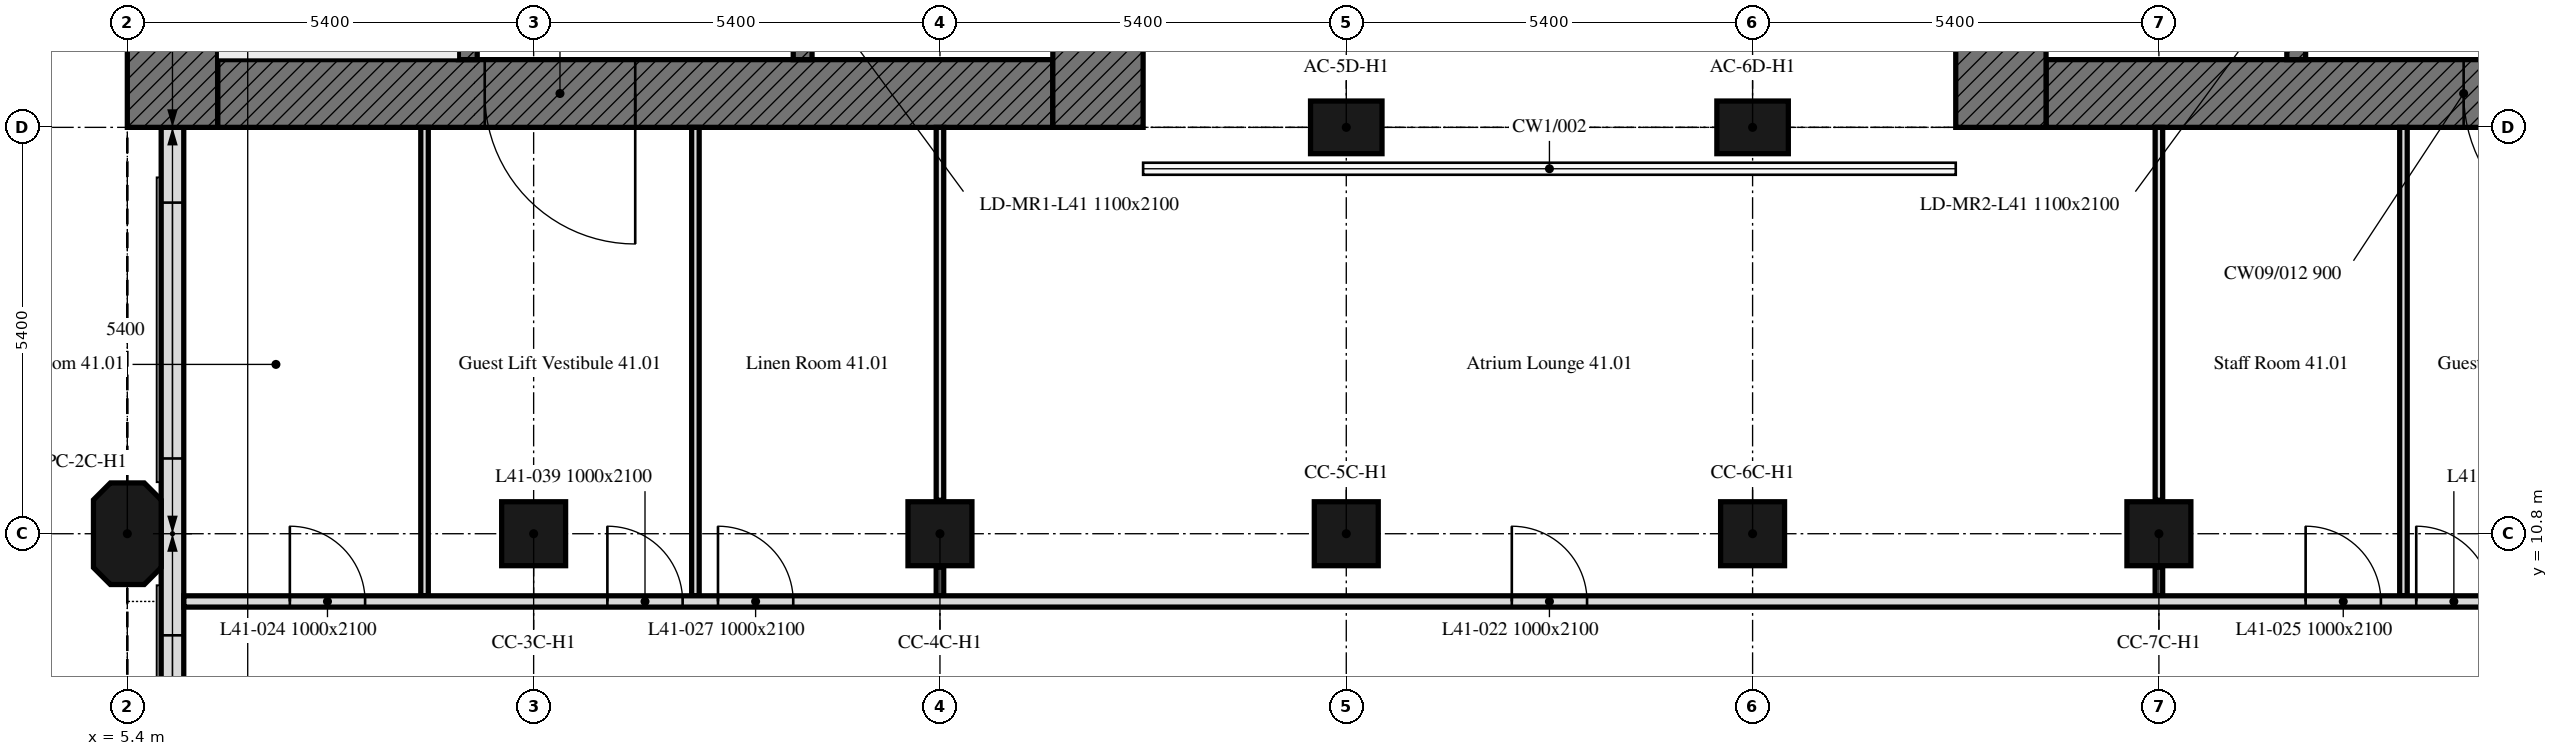
"""IFC4 building model, lengths in metres.
Left out: names, types, materials, properties, quantities, classifications, styles, units other than length and angle.
Written with IfcOpenShell. Run it as: python <this file> out.ifc"""

import sys

from ifc_helpers import new_model, si_unit, direction, frame, frame_2d, origin, origin_2d, place, context, subcontext, project, spatial, polyline, rectangle, outline, extrude, element, fill, save


model = new_model("IFC4")
c1 = context("Model", 3, precision=1e-05, world=origin(), true_north=direction((0.0, 1.0)))
c2 = subcontext(c1, "Body", "Model", "MODEL_VIEW")
j1 = project(units=[si_unit("LENGTHUNIT", "METRE"), si_unit("PLANEANGLEUNIT", "RADIAN")], contexts=[c1])
p1 = place(None, origin())
s1 = spatial("IfcSite", under=j1, at=p1, CompositionType="ELEMENT")
p2 = place(p1, origin())
s2 = spatial("IfcBuilding", under=s1, at=p2, CompositionType="ELEMENT")
p3 = place(p2, frame((0.0, 0.0, 172.6)))
s3 = spatial("IfcBuildingStorey", under=s2, at=p3, CompositionType="ELEMENT", Elevation=172.6)
p4 = place(p3, frame((5.4, 10.8, 0.0), z_axis=(0.0, 0.0, 1.0), x_axis=(0.0, 1.0, 0.0)))
e1 = element("IfcColumn", 1, at=p4, inside=s3, PredefinedType="COLUMN", context=c2, shape_type="SweptSolid", body=[
    extrude(outline(polyline([(-0.45, -0.45), (0.45, -0.45), (0.675, -0.225), (0.675, 0.225), (0.45, 0.45), (-0.45, 0.45), (-0.675, 0.225), (-0.675, -0.225), (-0.45, -0.45)])), origin(), (0.0, 0.0, 1.0), 2.8),
])
for number, where, z_axis, x_axis in (
    (2, (10.8, 10.8, 0.0), (0.0, 0.0, 1.0), (1.0, 0.0, 0.0)),
    (3, (16.2, 10.8, 0.0), (0.0, 0.0, 1.0), (1.0, 0.0, 0.0)),
    (4, (21.6, 10.8, 0.0), (0.0, 0.0, 1.0), (1.0, 0.0, 0.0)),
    (5, (27.0, 10.8, 0.0), (0.0, 0.0, 1.0), (1.0, 0.0, 0.0)),
    (6, (32.4, 10.8, 0.0), (0.0, 0.0, 1.0), (1.0, 0.0, 0.0)),
):
    element("IfcColumn", number, at=place(p3, frame(where, z_axis=z_axis, x_axis=x_axis)), inside=s3, PredefinedType="COLUMN", context=c2, shape_type="SweptSolid", body=[
        extrude(rectangle(XDim=0.85, YDim=0.85, at=origin_2d()), origin(), (0.0, 0.0, 1.0), 2.8),
    ])
for number, where, z_axis, x_axis in (
    (7, (21.6, 16.2, 0.0), (0.0, 0.0, 1.0), (1.0, 0.0, 0.0)),
    (8, (27.0, 16.2, 0.0), (0.0, 0.0, 1.0), (1.0, 0.0, 0.0)),
):
    element("IfcColumn", number, at=place(p3, frame(where, z_axis=z_axis, x_axis=x_axis)), inside=s3, PredefinedType="COLUMN", context=c2, shape_type="SweptSolid", body=[
        extrude(rectangle(XDim=0.95, YDim=0.7, at=origin_2d()), origin(), (0.0, 0.0, 1.0), 2.8),
    ])
p5 = place(p3, frame((6.0, 16.2, 0.0), z_axis=(0.0, 0.0, 1.0), x_axis=(0.0, -1.0, 0.0)))
e9 = element("IfcWall", 9, at=p5, inside=s3, PredefinedType="SOLIDWALL", context=c2, shape_type="SweptSolid", body=[
    extrude(rectangle(XDim=10.614, YDim=0.3, at=frame_2d((5.307, 0.0))), origin(), (0.0, 0.0, 1.0), 2.8),
])
p6 = place(p5, frame((1.0, 0.0, 0.9)))
e10 = element("IfcOpeningElement", 10, at=p6, cuts=e9, PredefinedType="OPENING", context=c2, shape_type="SweptSolid", body=[
    extrude(rectangle(XDim=3.4, YDim=1.7, at=frame_2d((1.7, 0.85))), frame((0.0, 0.16, 0.0), z_axis=(0.0, -1.0, 0.0), x_axis=(1.0, 0.0, 0.0)), (0.0, 0.0, 1.0), 0.32),
])
p7 = place(p5, frame((6.75, 0.0, 0.9)))
e11 = element("IfcOpeningElement", 11, at=p7, cuts=e9, PredefinedType="OPENING", context=c2, shape_type="SweptSolid", body=[
    extrude(rectangle(XDim=1.1, YDim=1.7, at=frame_2d((0.55, 0.85))), frame((0.0, 0.16, 0.0), z_axis=(0.0, -1.0, 0.0), x_axis=(1.0, 0.0, 0.0)), (0.0, 0.0, 1.0), 0.32),
])
p8 = place(p5, frame((8.35, 0.0, 0.9)))
e12 = element("IfcOpeningElement", 12, at=p8, cuts=e9, PredefinedType="OPENING", context=c2, shape_type="SweptSolid", body=[
    extrude(rectangle(XDim=1.1, YDim=1.7, at=frame_2d((0.55, 0.85))), frame((0.0, 0.16, 0.0), z_axis=(0.0, -1.0, 0.0), x_axis=(1.0, 0.0, 0.0)), (0.0, 0.0, 1.0), 0.32),
])
p9 = place(p3, frame((17.7, 16.65, 0.0), z_axis=(0.0, 0.0, 1.0), x_axis=(-1.0, 0.0, 0.0)))
e13 = element("IfcWall", 13, at=p9, inside=s3, PredefinedType="SOLIDWALL", context=c2, shape_type="SweptSolid", body=[
    extrude(rectangle(XDim=11.1, YDim=0.9, at=frame_2d((5.55, 0.0))), origin(), (0.0, 0.0, 1.0), 2.8),
])
p10 = place(p9, frame((5.55, 0.0, 0.0)))
e14 = element("IfcOpeningElement", 14, at=p10, cuts=e13, PredefinedType="OPENING", context=c2, shape_type="SweptSolid", body=[
    extrude(rectangle(XDim=2.0, YDim=2.4, at=frame_2d((1.0, 1.2))), frame((0.0, 0.45, 0.0), z_axis=(0.0, -1.0, 0.0), x_axis=(1.0, 0.0, 0.0)), (0.0, 0.0, 1.0), 0.9),
])
for number, where, z_axis, x_axis in (
    (15, (6.0, 16.2, 0.0), (0.0, 0.0, 1.0), (0.0, 1.0, 0.0)),
    (16, (18.3, 32.4, 0.0), (0.0, 0.0, 1.0), (0.0, -1.0, 0.0)),
):
    element("IfcWall", number, at=place(p3, frame(where, z_axis=z_axis, x_axis=x_axis)), inside=s3, PredefinedType="SOLIDWALL", context=c2, shape_type="SweptSolid", body=[
        extrude(rectangle(XDim=16.2, YDim=1.2, at=frame_2d((8.1, 0.0))), origin(), (0.0, 0.0, 1.0), 2.8),
    ])
p11 = place(p3, frame((9.925, 17.1, 0.0), z_axis=(0.0, 0.0, 1.0), x_axis=(0.0, 1.0, 0.0)))
e17 = element("IfcWall", 17, at=p11, inside=s3, PredefinedType="SOLIDWALL", context=c2, shape_type="SweptSolid", body=[
    extrude(rectangle(XDim=14.4, YDim=0.25, at=frame_2d((7.2, 0.0))), origin(), (0.0, 0.0, 1.0), 2.8),
])
p12 = place(p11, frame((4.6, 0.0, 0.0)))
e18 = element("IfcOpeningElement", 18, at=p12, cuts=e17, PredefinedType="OPENING", context=c2, shape_type="SweptSolid", body=[
    extrude(rectangle(XDim=1.0, YDim=2.1, at=frame_2d((0.5, 1.05))), frame((0.0, 0.125, 0.0), z_axis=(0.0, -1.0, 0.0), x_axis=(1.0, 0.0, 0.0)), (0.0, 0.0, 1.0), 0.25),
])
p13 = place(p11, frame((7.062, 0.0, 0.0)))
e19 = element("IfcOpeningElement", 19, at=p13, cuts=e17, PredefinedType="OPENING", context=c2, shape_type="SweptSolid", body=[
    extrude(rectangle(XDim=1.2, YDim=2.1, at=frame_2d((0.6, 1.05))), frame((0.0, 0.125, 0.0), z_axis=(0.0, -1.0, 0.0), x_axis=(1.0, 0.0, 0.0)), (0.0, 0.0, 1.0), 0.25),
])
p14 = place(p11, frame((9.599, 0.0, 0.0)))
e20 = element("IfcOpeningElement", 20, at=p14, cuts=e17, PredefinedType="OPENING", context=c2, shape_type="SweptSolid", body=[
    extrude(rectangle(XDim=0.9, YDim=2.1, at=frame_2d((0.45, 1.05))), frame((0.0, 0.125, 0.0), z_axis=(0.0, -1.0, 0.0), x_axis=(1.0, 0.0, 0.0)), (0.0, 0.0, 1.0), 0.25),
])
p15 = place(p11, frame((11.032, 0.0, 0.0)))
e21 = element("IfcOpeningElement", 21, at=p15, cuts=e17, PredefinedType="OPENING", context=c2, shape_type="SweptSolid", body=[
    extrude(rectangle(XDim=0.9, YDim=2.1, at=frame_2d((0.45, 1.05))), frame((0.0, 0.125, 0.0), z_axis=(0.0, -1.0, 0.0), x_axis=(1.0, 0.0, 0.0)), (0.0, 0.0, 1.0), 0.25),
])
p16 = place(p11, frame((12.846, 0.0, 0.0)))
e22 = element("IfcOpeningElement", 22, at=p16, cuts=e17, PredefinedType="OPENING", context=c2, shape_type="SweptSolid", body=[
    extrude(rectangle(XDim=0.9, YDim=2.1, at=frame_2d((0.45, 1.05))), frame((0.0, 0.125, 0.0), z_axis=(0.0, -1.0, 0.0), x_axis=(1.0, 0.0, 0.0)), (0.0, 0.0, 1.0), 0.25),
])
p17 = place(p3, frame((14.375, 17.1, 0.0), z_axis=(0.0, 0.0, 1.0), x_axis=(0.0, 1.0, 0.0)))
e23 = element("IfcWall", 23, at=p17, inside=s3, PredefinedType="SOLIDWALL", context=c2, shape_type="SweptSolid", body=[
    extrude(rectangle(XDim=14.4, YDim=0.25, at=frame_2d((7.2, 0.0))), origin(), (0.0, 0.0, 1.0), 2.8),
])
p18 = place(p17, frame((13.15, 0.0, 0.0)))
e24 = element("IfcOpeningElement", 24, at=p18, cuts=e23, PredefinedType="OPENING", context=c2, shape_type="SweptSolid", body=[
    extrude(rectangle(XDim=1.0, YDim=2.1, at=frame_2d((0.5, 1.05))), frame((0.0, 0.125, 0.0), z_axis=(0.0, -1.0, 0.0), x_axis=(1.0, 0.0, 0.0)), (0.0, 0.0, 1.0), 0.25),
])
p19 = place(p17, frame((0.6, 0.0, 0.0)))
e25 = element("IfcOpeningElement", 25, at=p19, cuts=e23, PredefinedType="OPENING", context=c2, shape_type="SweptSolid", body=[
    extrude(rectangle(XDim=1.1, YDim=2.1, at=frame_2d((0.55, 1.05))), frame((0.0, 0.125, 0.0), z_axis=(0.0, -1.0, 0.0), x_axis=(1.0, 0.0, 0.0)), (0.0, 0.0, 1.0), 0.25),
])
p20 = place(p17, frame((3.25, 0.0, 0.0)))
e26 = element("IfcOpeningElement", 26, at=p20, cuts=e23, PredefinedType="OPENING", context=c2, shape_type="SweptSolid", body=[
    extrude(rectangle(XDim=0.9, YDim=2.1, at=frame_2d((0.45, 1.05))), frame((0.0, 0.125, 0.0), z_axis=(0.0, -1.0, 0.0), x_axis=(1.0, 0.0, 0.0)), (0.0, 0.0, 1.0), 0.25),
])
p21 = place(p3, frame((42.0, 16.65, 0.0), z_axis=(0.0, 0.0, 1.0), x_axis=(-1.0, 0.0, 0.0)))
e27 = element("IfcWall", 27, at=p21, inside=s3, PredefinedType="SOLIDWALL", context=c2, shape_type="SweptSolid", body=[
    extrude(rectangle(XDim=11.1, YDim=0.9, at=frame_2d((5.55, 0.0))), origin(), (0.0, 0.0, 1.0), 2.8),
])
p22 = place(p21, frame((3.55, 0.0, 0.0)))
e28 = element("IfcOpeningElement", 28, at=p22, cuts=e27, PredefinedType="OPENING", context=c2, shape_type="SweptSolid", body=[
    extrude(rectangle(XDim=2.0, YDim=2.4, at=frame_2d((1.0, 1.2))), frame((0.0, 0.45, 0.0), z_axis=(0.0, -1.0, 0.0), x_axis=(1.0, 0.0, 0.0)), (0.0, 0.0, 1.0), 0.9),
])
p23 = place(p3, frame((30.3, 16.2, 0.0), z_axis=(0.0, 0.0, 1.0), x_axis=(0.0, 1.0, 0.0)))
e29 = element("IfcWall", 29, at=p23, inside=s3, PredefinedType="SOLIDWALL", context=c2, shape_type="SweptSolid", body=[
    extrude(rectangle(XDim=16.2, YDim=1.2, at=frame_2d((8.1, 0.0))), origin(), (0.0, 0.0, 1.0), 2.8),
])
p24 = place(p3, frame((34.225, 17.1, 0.0), z_axis=(0.0, 0.0, 1.0), x_axis=(0.0, 1.0, 0.0)))
e30 = element("IfcWall", 30, at=p24, inside=s3, PredefinedType="SOLIDWALL", context=c2, shape_type="SweptSolid", body=[
    extrude(rectangle(XDim=14.4, YDim=0.25, at=frame_2d((7.2, 0.0))), origin(), (0.0, 0.0, 1.0), 2.8),
])
p25 = place(p24, frame((13.15, 0.0, 0.0)))
e31 = element("IfcOpeningElement", 31, at=p25, cuts=e30, PredefinedType="OPENING", context=c2, shape_type="SweptSolid", body=[
    extrude(rectangle(XDim=1.0, YDim=2.1, at=frame_2d((0.5, 1.05))), frame((0.0, 0.125, 0.0), z_axis=(0.0, -1.0, 0.0), x_axis=(1.0, 0.0, 0.0)), (0.0, 0.0, 1.0), 0.25),
])
p26 = place(p24, frame((0.6, 0.0, 0.0)))
e32 = element("IfcOpeningElement", 32, at=p26, cuts=e30, PredefinedType="OPENING", context=c2, shape_type="SweptSolid", body=[
    extrude(rectangle(XDim=1.1, YDim=2.1, at=frame_2d((0.55, 1.05))), frame((0.0, 0.125, 0.0), z_axis=(0.0, -1.0, 0.0), x_axis=(1.0, 0.0, 0.0)), (0.0, 0.0, 1.0), 0.25),
])
p27 = place(p24, frame((3.25, 0.0, 0.0)))
e33 = element("IfcOpeningElement", 33, at=p27, cuts=e30, PredefinedType="OPENING", context=c2, shape_type="SweptSolid", body=[
    extrude(rectangle(XDim=0.9, YDim=2.1, at=frame_2d((0.45, 1.05))), frame((0.0, 0.125, 0.0), z_axis=(0.0, -1.0, 0.0), x_axis=(1.0, 0.0, 0.0)), (0.0, 0.0, 1.0), 0.25),
])
p28 = place(p3, frame((16.2, 16.2, 0.0), z_axis=(0.0, 0.0, 1.0), x_axis=(0.0, -1.0, 0.0)))
e34 = element("IfcWall", 34, at=p28, inside=s3, PredefinedType="PARTITIONING", context=c2, shape_type="SweptSolid", body=[
    extrude(rectangle(XDim=4.955, YDim=0.1, at=frame_2d((2.478, 0.0))), origin(), (0.0, 0.0, 1.0), 2.2),
])
for number, where, z_axis, x_axis in (
    (35, (16.2, 10.355, 0.0), (0.0, 0.0, 1.0), (0.0, -1.0, 0.0)),
    (36, (32.4, 9.975, 0.0), (0.0, 0.0, 1.0), (0.0, 1.0, 0.0)),
):
    element("IfcWall", number, at=place(p3, frame(where, z_axis=z_axis, x_axis=x_axis)), inside=s3, PredefinedType="PARTITIONING", context=c2, shape_type="SweptSolid", body=[
        extrude(rectangle(XDim=0.38, YDim=0.1, at=frame_2d((0.19, 0.0))), origin(), (0.0, 0.0, 1.0), 2.2),
    ])
p29 = place(p3, frame((32.4, 11.245, 0.0), z_axis=(0.0, 0.0, 1.0), x_axis=(0.0, 1.0, 0.0)))
e37 = element("IfcWall", 37, at=p29, inside=s3, PredefinedType="PARTITIONING", context=c2, shape_type="SweptSolid", body=[
    extrude(rectangle(XDim=4.955, YDim=0.1, at=frame_2d((2.478, 0.0))), origin(), (0.0, 0.0, 1.0), 2.2),
])
for number, where, z_axis, x_axis in (
    (38, (9.35, 16.2, 0.0), (0.0, 0.0, 1.0), (0.0, -1.0, 0.0)),
    (39, (12.95, 9.975, 0.0), (0.0, 0.0, 1.0), (0.0, 1.0, 0.0)),
):
    element("IfcWall", number, at=place(p3, frame(where, z_axis=z_axis, x_axis=x_axis)), inside=s3, PredefinedType="PARTITIONING", context=c2, shape_type="SweptSolid", body=[
        extrude(rectangle(XDim=6.225, YDim=0.1, at=frame_2d((3.112, 0.0))), origin(), (0.0, 0.0, 1.0), 2.8),
    ])
p30 = place(p3, frame((35.65, 16.2, 0.0), z_axis=(0.0, 0.0, 1.0), x_axis=(0.0, -1.0, 0.0)))
e40 = element("IfcWall", 40, at=p30, inside=s3, PredefinedType="PARTITIONING", context=c2, shape_type="SweptSolid", body=[
    extrude(rectangle(XDim=6.225, YDim=0.1, at=frame_2d((3.112, 0.0))), origin(), (0.0, 0.0, 1.0), 2.2),
])
p31 = place(p3, frame((6.151, 9.9, 0.0), z_axis=(0.0, 0.0, 1.0), x_axis=(1.0, 0.0, 0.0)))
e41 = element("IfcWall", 41, at=p31, inside=s3, PredefinedType="PARTITIONING", context=c2, shape_type="SweptSolid", body=[
    extrude(rectangle(XDim=36.974, YDim=0.15, at=frame_2d((18.487, 0.0))), origin(), (0.0, 0.0, 1.0), 2.2),
])
p32 = place(p31, frame((17.649, 0.0, 0.0)))
e42 = element("IfcOpeningElement", 42, at=p32, cuts=e41, PredefinedType="OPENING", context=c2, shape_type="SweptSolid", body=[
    extrude(rectangle(XDim=1.0, YDim=2.1, at=frame_2d((0.5, 1.05))), frame((0.0, 0.075, 0.0), z_axis=(0.0, -1.0, 0.0), x_axis=(1.0, 0.0, 0.0)), (0.0, 0.0, 1.0), 0.15),
])
p33 = place(p31, frame((1.409, 0.0, 0.0)))
e43 = element("IfcOpeningElement", 43, at=p33, cuts=e41, PredefinedType="OPENING", context=c2, shape_type="SweptSolid", body=[
    extrude(rectangle(XDim=1.0, YDim=2.1, at=frame_2d((0.5, 1.05))), frame((0.0, 0.075, 0.0), z_axis=(0.0, -1.0, 0.0), x_axis=(1.0, 0.0, 0.0)), (0.0, 0.0, 1.0), 0.15),
])
p34 = place(p31, frame((28.199, 0.0, 0.0)))
e44 = element("IfcOpeningElement", 44, at=p34, cuts=e41, PredefinedType="OPENING", context=c2, shape_type="SweptSolid", body=[
    extrude(rectangle(XDim=1.0, YDim=2.1, at=frame_2d((0.5, 1.05))), frame((0.0, 0.075, 0.0), z_axis=(0.0, -1.0, 0.0), x_axis=(1.0, 0.0, 0.0)), (0.0, 0.0, 1.0), 0.15),
])
p35 = place(p31, frame((7.099, 0.0, 0.0)))
e45 = element("IfcOpeningElement", 45, at=p35, cuts=e41, PredefinedType="OPENING", context=c2, shape_type="SweptSolid", body=[
    extrude(rectangle(XDim=1.0, YDim=2.1, at=frame_2d((0.5, 1.05))), frame((0.0, 0.075, 0.0), z_axis=(0.0, -1.0, 0.0), x_axis=(1.0, 0.0, 0.0)), (0.0, 0.0, 1.0), 0.15),
])
p36 = place(p31, frame((5.629, 0.0, 0.0)))
e46 = element("IfcOpeningElement", 46, at=p36, cuts=e41, PredefinedType="OPENING", context=c2, shape_type="SweptSolid", body=[
    extrude(rectangle(XDim=1.0, YDim=2.1, at=frame_2d((0.5, 1.05))), frame((0.0, 0.075, 0.0), z_axis=(0.0, -1.0, 0.0), x_axis=(1.0, 0.0, 0.0)), (0.0, 0.0, 1.0), 0.15),
])
p37 = place(p31, frame((29.669, 0.0, 0.0)))
e47 = element("IfcOpeningElement", 47, at=p37, cuts=e41, PredefinedType="OPENING", context=c2, shape_type="SweptSolid", body=[
    extrude(rectangle(XDim=1.0, YDim=2.1, at=frame_2d((0.5, 1.05))), frame((0.0, 0.075, 0.0), z_axis=(0.0, -1.0, 0.0), x_axis=(1.0, 0.0, 0.0)), (0.0, 0.0, 1.0), 0.15),
])
p38 = place(p6, origin())
e48 = element("IfcWindow", 48, at=p38, inside=s3, PartitioningType="SINGLE_PANEL", PredefinedType="WINDOW", context=c2, shape_type="SweptSolid", body=[
    extrude(rectangle(XDim=3.4, YDim=1.7, at=frame_2d((1.7, 0.85))), frame((0.0, 0.03, 0.0), z_axis=(0.0, -1.0, 0.0), x_axis=(1.0, 0.0, 0.0)), (0.0, 0.0, 1.0), 0.06),
])
fill(e10, e48)
p39 = place(p7, origin())
e49 = element("IfcWindow", 49, at=p39, inside=s3, PartitioningType="SINGLE_PANEL", PredefinedType="WINDOW", context=c2, shape_type="SweptSolid", body=[
    extrude(rectangle(XDim=1.1, YDim=1.7, at=frame_2d((0.55, 0.85))), frame((0.0, 0.03, 0.0), z_axis=(0.0, -1.0, 0.0), x_axis=(1.0, 0.0, 0.0)), (0.0, 0.0, 1.0), 0.06),
])
fill(e11, e49)
p40 = place(p10, origin())
e50 = element("IfcDoor", 50, at=p40, inside=s3, OperationType="DOUBLE_DOOR_SINGLE_SWING", PredefinedType="DOOR", context=c2, shape_type="SweptSolid", body=[
    extrude(rectangle(XDim=2.0, YDim=2.4, at=frame_2d((1.0, 1.2))), frame((0.0, 0.025, 0.0), z_axis=(0.0, -1.0, 0.0), x_axis=(1.0, 0.0, 0.0)), (0.0, 0.0, 1.0), 0.05),
])
fill(e14, e50)
p41 = place(p22, origin())
e51 = element("IfcDoor", 51, at=p41, inside=s3, OperationType="DOUBLE_DOOR_SINGLE_SWING", PredefinedType="DOOR", context=c2, shape_type="SweptSolid", body=[
    extrude(rectangle(XDim=2.0, YDim=2.4, at=frame_2d((1.0, 1.2))), frame((0.0, 0.025, 0.0), z_axis=(0.0, -1.0, 0.0), x_axis=(1.0, 0.0, 0.0)), (0.0, 0.0, 1.0), 0.05),
])
fill(e28, e51)
p42 = place(p32, origin())
e52 = element("IfcDoor", 52, at=p42, inside=s3, OperationType="SINGLE_SWING_RIGHT", PredefinedType="DOOR", context=c2, shape_type="SweptSolid", body=[
    extrude(rectangle(XDim=1.0, YDim=2.1, at=frame_2d((0.5, 1.05))), frame((0.0, 0.025, 0.0), z_axis=(0.0, -1.0, 0.0), x_axis=(1.0, 0.0, 0.0)), (0.0, 0.0, 1.0), 0.05),
])
fill(e42, e52)
p43 = place(p33, origin())
e53 = element("IfcDoor", 53, at=p43, inside=s3, OperationType="SINGLE_SWING_LEFT", PredefinedType="DOOR", context=c2, shape_type="SweptSolid", body=[
    extrude(rectangle(XDim=1.0, YDim=2.1, at=frame_2d((0.5, 1.05))), frame((0.0, 0.025, 0.0), z_axis=(0.0, -1.0, 0.0), x_axis=(1.0, 0.0, 0.0)), (0.0, 0.0, 1.0), 0.05),
])
fill(e43, e53)
p44 = place(p34, origin())
e54 = element("IfcDoor", 54, at=p44, inside=s3, OperationType="SINGLE_SWING_LEFT", PredefinedType="DOOR", context=c2, shape_type="SweptSolid", body=[
    extrude(rectangle(XDim=1.0, YDim=2.1, at=frame_2d((0.5, 1.05))), frame((0.0, 0.025, 0.0), z_axis=(0.0, -1.0, 0.0), x_axis=(1.0, 0.0, 0.0)), (0.0, 0.0, 1.0), 0.05),
])
fill(e44, e54)
p45 = place(p35, origin())
e55 = element("IfcDoor", 55, at=p45, inside=s3, OperationType="SINGLE_SWING_RIGHT", PredefinedType="DOOR", context=c2, shape_type="SweptSolid", body=[
    extrude(rectangle(XDim=1.0, YDim=2.1, at=frame_2d((0.5, 1.05))), frame((0.0, 0.025, 0.0), z_axis=(0.0, -1.0, 0.0), x_axis=(1.0, 0.0, 0.0)), (0.0, 0.0, 1.0), 0.05),
])
fill(e45, e55)
p46 = place(p36, origin())
e56 = element("IfcDoor", 56, at=p46, inside=s3, OperationType="SINGLE_SWING_LEFT", PredefinedType="DOOR", context=c2, shape_type="SweptSolid", body=[
    extrude(rectangle(XDim=1.0, YDim=2.1, at=frame_2d((0.5, 1.05))), frame((0.0, 0.025, 0.0), z_axis=(0.0, -1.0, 0.0), x_axis=(1.0, 0.0, 0.0)), (0.0, 0.0, 1.0), 0.05),
])
fill(e46, e56)
p47 = place(p37, origin())
e57 = element("IfcDoor", 57, at=p47, inside=s3, OperationType="SINGLE_SWING_LEFT", PredefinedType="DOOR", context=c2, shape_type="SweptSolid", body=[
    extrude(rectangle(XDim=1.0, YDim=2.1, at=frame_2d((0.5, 1.05))), frame((0.0, 0.025, 0.0), z_axis=(0.0, -1.0, 0.0), x_axis=(1.0, 0.0, 0.0)), (0.0, 0.0, 1.0), 0.05),
])
fill(e47, e57)
save(model, sys.argv[1])
